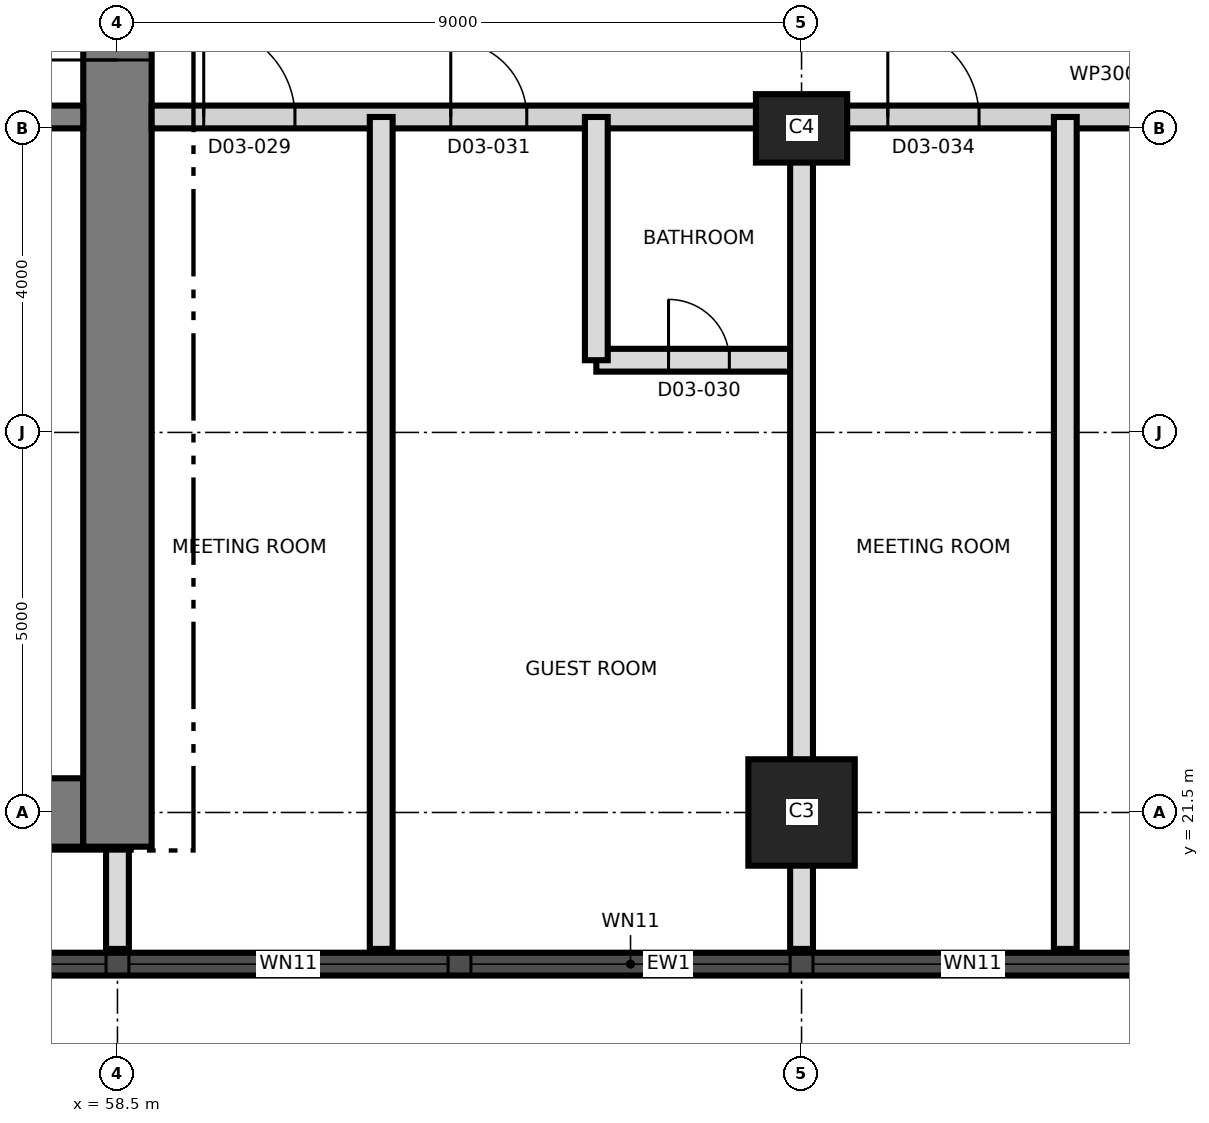
"""IFC4 building model, lengths in metres.
Left out: names, types, materials, properties, quantities, classifications, styles, units other than length and angle.
Written with IfcOpenShell. Run it as: python <this file> out.ifc"""

import sys

from ifc_helpers import new_model, si_unit, direction, frame, frame_2d, origin, origin_2d, place, context, subcontext, project, spatial, rectangle, extrude, element, fill, save


model = new_model("IFC4")
c1 = context("Model", 3, precision=1e-05, world=origin(), true_north=direction((0.0, 1.0)))
c2 = subcontext(c1, "Body", "Model", "MODEL_VIEW")
j1 = project(units=[si_unit("LENGTHUNIT", "METRE"), si_unit("PLANEANGLEUNIT", "RADIAN")], contexts=[c1])
p1 = place(None, origin())
s1 = spatial("IfcSite", under=j1, at=p1, CompositionType="ELEMENT")
p2 = place(p1, origin())
s2 = spatial("IfcBuilding", under=s1, at=p2, CompositionType="ELEMENT")
p3 = place(p2, frame((0.0, 0.0, 55.7)))
s3 = spatial("IfcBuildingStorey", under=s2, at=p3, CompositionType="ELEMENT", Elevation=55.7)
p4 = place(p3, frame((31.05, 21.5, 0.0), z_axis=(0.0, 0.0, 1.0), x_axis=(1.0, 0.0, 0.0)))
e1 = element("IfcWall", 1, at=p4, inside=s3, PredefinedType="SHEAR", context=c2, shape_type="SweptSolid", body=[
    extrude(rectangle(XDim=27.0, YDim=0.9, at=frame_2d((13.5, 0.0))), origin(), (0.0, 0.0, 1.0), 3.7),
])
p5 = place(p3, frame((58.5, 21.05, 0.0), z_axis=(0.0, 0.0, 1.0), x_axis=(0.0, 1.0, 0.0)))
e2 = element("IfcWall", 2, at=p5, inside=s3, PredefinedType="SHEAR", context=c2, shape_type="SweptSolid", body=[
    extrude(rectangle(XDim=18.9, YDim=0.9, at=frame_2d((9.45, 0.0))), origin(), (0.0, 0.0, 1.0), 3.7),
])
p6 = place(p5, frame((10.35, 0.0, 0.0)))
e3 = element("IfcOpeningElement", 3, at=p6, cuts=e2, PredefinedType="OPENING", context=c2, shape_type="SweptSolid", body=[
    extrude(rectangle(XDim=1.2, YDim=2.1, at=frame_2d((0.6, 1.05))), frame((0.0, 0.46, 0.0), z_axis=(0.0, -1.0, 0.0), x_axis=(1.0, 0.0, 0.0)), (0.0, 0.0, 1.0), 0.92),
])
p7 = place(p3, frame((31.95, 30.65, 0.0), z_axis=(0.0, 0.0, 1.0), x_axis=(1.0, 0.0, 0.0)))
e4 = element("IfcWall", 4, at=p7, inside=s3, PredefinedType="SHEAR", context=c2, shape_type="SweptSolid", body=[
    extrude(rectangle(XDim=26.1, YDim=0.3, at=frame_2d((13.05, 0.0))), origin(), (0.0, 0.0, 1.0), 3.7),
])
p8 = place(p7, frame((24.55, 0.0, 0.0)))
e5 = element("IfcOpeningElement", 5, at=p8, cuts=e4, PredefinedType="OPENING", context=c2, shape_type="SweptSolid", body=[
    extrude(rectangle(XDim=1.0, YDim=2.1, at=frame_2d((0.5, 1.05))), frame((0.0, 0.16, 0.0), z_axis=(0.0, -1.0, 0.0), x_axis=(1.0, 0.0, 0.0)), (0.0, 0.0, 1.0), 0.32),
])
p9 = place(p7, frame((11.35, 0.0, 0.0)))
e6 = element("IfcOpeningElement", 6, at=p9, cuts=e4, PredefinedType="OPENING", context=c2, shape_type="SweptSolid", body=[
    extrude(rectangle(XDim=1.0, YDim=2.1, at=frame_2d((0.5, 1.05))), frame((0.0, 0.16, 0.0), z_axis=(0.0, -1.0, 0.0), x_axis=(1.0, 0.0, 0.0)), (0.0, 0.0, 1.0), 0.32),
])
p10 = place(p3, frame((67.5, 21.5, 0.0), z_axis=(0.0, 0.0, 1.0), x_axis=(1.0, 0.0, 0.0)))
e7 = element("IfcColumn", 7, at=p10, inside=s3, PredefinedType="COLUMN", context=c2, shape_type="SweptSolid", body=[
    extrude(rectangle(XDim=1.4, YDim=1.4, at=origin_2d()), origin(), (0.0, 0.0, 1.0), 3.7),
])
p11 = place(p3, frame((67.5, 30.5, 0.0), z_axis=(0.0, 0.0, 1.0), x_axis=(1.0, 0.0, 0.0)))
e8 = element("IfcColumn", 8, at=p11, inside=s3, PredefinedType="COLUMN", context=c2, shape_type="SweptSolid", body=[
    extrude(rectangle(XDim=1.2, YDim=0.9, at=origin_2d()), origin(), (0.0, 0.0, 1.0), 3.7),
])
p12 = place(p3, frame((44.01, 19.505, 0.0), z_axis=(0.0, 0.0, 1.0), x_axis=(1.0, 0.0, 0.0)))
e9 = element("IfcWall", 9, at=p12, inside=s3, PredefinedType="SOLIDWALL", context=c2, shape_type="SweptSolid", body=[
    extrude(rectangle(XDim=43.478, YDim=0.3, at=frame_2d((21.739, 0.0))), origin(), (0.0, 0.0, 1.0), 3.4),
])
p13 = place(p12, frame((1.845, 0.0, 0.3)))
e10 = element("IfcOpeningElement", 10, at=p13, cuts=e9, PredefinedType="OPENING", context=c2, shape_type="SweptSolid", body=[
    extrude(rectangle(XDim=1.8, YDim=2.4, at=frame_2d((0.9, 1.2))), frame((0.0, 0.16, 0.0), z_axis=(0.0, -1.0, 0.0), x_axis=(1.0, 0.0, 0.0)), (0.0, 0.0, 1.0), 0.32),
])
p14 = place(p12, frame((5.64, 0.0, 0.9)))
e11 = element("IfcOpeningElement", 11, at=p14, cuts=e9, PredefinedType="OPENING", context=c2, shape_type="SweptSolid", body=[
    extrude(rectangle(XDim=4.2, YDim=1.5, at=frame_2d((2.1, 0.75))), frame((0.0, 0.16, 0.0), z_axis=(0.0, -1.0, 0.0), x_axis=(1.0, 0.0, 0.0)), (0.0, 0.0, 1.0), 0.32),
])
p15 = place(p12, frame((10.14, 0.0, 0.9)))
e12 = element("IfcOpeningElement", 12, at=p15, cuts=e9, PredefinedType="OPENING", context=c2, shape_type="SweptSolid", body=[
    extrude(rectangle(XDim=4.2, YDim=1.5, at=frame_2d((2.1, 0.75))), frame((0.0, 0.16, 0.0), z_axis=(0.0, -1.0, 0.0), x_axis=(1.0, 0.0, 0.0)), (0.0, 0.0, 1.0), 0.32),
])
p16 = place(p12, frame((14.64, 0.0, 0.9)))
e13 = element("IfcOpeningElement", 13, at=p16, cuts=e9, PredefinedType="OPENING", context=c2, shape_type="SweptSolid", body=[
    extrude(rectangle(XDim=4.2, YDim=1.5, at=frame_2d((2.1, 0.75))), frame((0.0, 0.16, 0.0), z_axis=(0.0, -1.0, 0.0), x_axis=(1.0, 0.0, 0.0)), (0.0, 0.0, 1.0), 0.32),
])
p17 = place(p12, frame((19.14, 0.0, 0.9)))
e14 = element("IfcOpeningElement", 14, at=p17, cuts=e9, PredefinedType="OPENING", context=c2, shape_type="SweptSolid", body=[
    extrude(rectangle(XDim=4.2, YDim=1.5, at=frame_2d((2.1, 0.75))), frame((0.0, 0.16, 0.0), z_axis=(0.0, -1.0, 0.0), x_axis=(1.0, 0.0, 0.0)), (0.0, 0.0, 1.0), 0.32),
])
p18 = place(p12, frame((23.64, 0.0, 0.9)))
e15 = element("IfcOpeningElement", 15, at=p18, cuts=e9, PredefinedType="OPENING", context=c2, shape_type="SweptSolid", body=[
    extrude(rectangle(XDim=4.2, YDim=1.5, at=frame_2d((2.1, 0.75))), frame((0.0, 0.16, 0.0), z_axis=(0.0, -1.0, 0.0), x_axis=(1.0, 0.0, 0.0)), (0.0, 0.0, 1.0), 0.32),
])
p19 = place(p12, frame((28.14, 0.0, 0.9)))
e16 = element("IfcOpeningElement", 16, at=p19, cuts=e9, PredefinedType="OPENING", context=c2, shape_type="SweptSolid", body=[
    extrude(rectangle(XDim=4.2, YDim=1.5, at=frame_2d((2.1, 0.75))), frame((0.0, 0.16, 0.0), z_axis=(0.0, -1.0, 0.0), x_axis=(1.0, 0.0, 0.0)), (0.0, 0.0, 1.0), 0.32),
])
p20 = place(p12, frame((32.64, 0.0, 0.9)))
e17 = element("IfcOpeningElement", 17, at=p20, cuts=e9, PredefinedType="OPENING", context=c2, shape_type="SweptSolid", body=[
    extrude(rectangle(XDim=4.2, YDim=1.5, at=frame_2d((2.1, 0.75))), frame((0.0, 0.16, 0.0), z_axis=(0.0, -1.0, 0.0), x_axis=(1.0, 0.0, 0.0)), (0.0, 0.0, 1.0), 0.32),
])
p21 = place(p12, frame((37.14, 0.0, 0.9)))
e18 = element("IfcOpeningElement", 18, at=p21, cuts=e9, PredefinedType="OPENING", context=c2, shape_type="SweptSolid", body=[
    extrude(rectangle(XDim=4.2, YDim=1.5, at=frame_2d((2.1, 0.75))), frame((0.0, 0.16, 0.0), z_axis=(0.0, -1.0, 0.0), x_axis=(1.0, 0.0, 0.0)), (0.0, 0.0, 1.0), 0.32),
])
p22 = place(p3, frame((64.8, 27.45, 0.0), z_axis=(0.0, 0.0, 1.0), x_axis=(1.0, 0.0, 0.0)))
e19 = element("IfcWall", 19, at=p22, inside=s3, PredefinedType="PARTITIONING", context=c2, shape_type="SweptSolid", body=[
    extrude(rectangle(XDim=2.7, YDim=0.3, at=frame_2d((1.35, 0.0))), origin(), (0.0, 0.0, 1.0), 3.4),
])
p23 = place(p22, frame((0.95, 0.0, 0.0)))
e20 = element("IfcOpeningElement", 20, at=p23, cuts=e19, PredefinedType="OPENING", context=c2, shape_type="SweptSolid", body=[
    extrude(rectangle(XDim=0.8, YDim=2.1, at=frame_2d((0.4, 1.05))), frame((0.0, 0.16, 0.0), z_axis=(0.0, -1.0, 0.0), x_axis=(1.0, 0.0, 0.0)), (0.0, 0.0, 1.0), 0.32),
])
p24 = place(p3, frame((58.95, 30.65, 0.0), z_axis=(0.0, 0.0, 1.0), x_axis=(1.0, 0.0, 0.0)))
e21 = element("IfcWall", 21, at=p24, inside=s3, PredefinedType="PARTITIONING", context=c2, shape_type="SweptSolid", body=[
    extrude(rectangle(XDim=26.38, YDim=0.3, at=frame_2d((13.19, 0.0))), origin(), (0.0, 0.0, 1.0), 3.4),
])
p25 = place(p24, frame((0.685, 0.0, 0.0)))
e22 = element("IfcOpeningElement", 22, at=p25, cuts=e21, PredefinedType="OPENING", context=c2, shape_type="SweptSolid", body=[
    extrude(rectangle(XDim=1.2, YDim=2.1, at=frame_2d((0.6, 1.05))), frame((0.0, 0.16, 0.0), z_axis=(0.0, -1.0, 0.0), x_axis=(1.0, 0.0, 0.0)), (0.0, 0.0, 1.0), 0.32),
])
p26 = place(p24, frame((3.935, 0.0, 0.0)))
e23 = element("IfcOpeningElement", 23, at=p26, cuts=e21, PredefinedType="OPENING", context=c2, shape_type="SweptSolid", body=[
    extrude(rectangle(XDim=1.0, YDim=2.1, at=frame_2d((0.5, 1.05))), frame((0.0, 0.16, 0.0), z_axis=(0.0, -1.0, 0.0), x_axis=(1.0, 0.0, 0.0)), (0.0, 0.0, 1.0), 0.32),
])
p27 = place(p24, frame((9.685, 0.0, 0.0)))
e24 = element("IfcOpeningElement", 24, at=p27, cuts=e21, PredefinedType="OPENING", context=c2, shape_type="SweptSolid", body=[
    extrude(rectangle(XDim=1.2, YDim=2.1, at=frame_2d((0.6, 1.05))), frame((0.0, 0.16, 0.0), z_axis=(0.0, -1.0, 0.0), x_axis=(1.0, 0.0, 0.0)), (0.0, 0.0, 1.0), 0.32),
])
p28 = place(p24, frame((12.935, 0.0, 0.0)))
e25 = element("IfcOpeningElement", 25, at=p28, cuts=e21, PredefinedType="OPENING", context=c2, shape_type="SweptSolid", body=[
    extrude(rectangle(XDim=1.0, YDim=2.1, at=frame_2d((0.5, 1.05))), frame((0.0, 0.16, 0.0), z_axis=(0.0, -1.0, 0.0), x_axis=(1.0, 0.0, 0.0)), (0.0, 0.0, 1.0), 0.32),
])
p29 = place(p24, frame((21.55, 0.0, 0.0)))
e26 = element("IfcOpeningElement", 26, at=p29, cuts=e21, PredefinedType="OPENING", context=c2, shape_type="SweptSolid", body=[
    extrude(rectangle(XDim=1.0, YDim=2.4, at=frame_2d((0.5, 1.2))), frame((0.0, 0.16, 0.0), z_axis=(0.0, -1.0, 0.0), x_axis=(1.0, 0.0, 0.0)), (0.0, 0.0, 1.0), 0.32),
])
p30 = place(p3, frame((58.5, 19.705, 0.0), z_axis=(0.0, 0.0, 1.0), x_axis=(0.0, 1.0, 0.0)))
e27 = element("IfcWall", 27, at=p30, inside=s3, PredefinedType="PARTITIONING", context=c2, shape_type="SweptSolid", body=[
    extrude(rectangle(XDim=1.325, YDim=0.3, at=frame_2d((0.663, 0.0))), origin(), (0.0, 0.0, 1.0), 3.4),
])
p31 = place(p3, frame((61.97, 19.705, 0.0), z_axis=(0.0, 0.0, 1.0), x_axis=(0.0, 1.0, 0.0)))
e28 = element("IfcWall", 28, at=p31, inside=s3, PredefinedType="PARTITIONING", context=c2, shape_type="SweptSolid", body=[
    extrude(rectangle(XDim=10.945, YDim=0.3, at=frame_2d((5.472, 0.0))), origin(), (0.0, 0.0, 1.0), 3.4),
])
p32 = place(p3, frame((64.8, 27.45, 0.0), z_axis=(0.0, 0.0, 1.0), x_axis=(0.0, 1.0, 0.0)))
e29 = element("IfcWall", 29, at=p32, inside=s3, PredefinedType="PARTITIONING", context=c2, shape_type="SweptSolid", body=[
    extrude(rectangle(XDim=3.2, YDim=0.3, at=frame_2d((1.6, 0.0))), origin(), (0.0, 0.0, 1.0), 3.4),
])
for number, where, z_axis, x_axis in (
    (30, (67.5, 19.705, 0.0), (0.0, 0.0, 1.0), (0.0, 1.0, 0.0)),
    (31, (70.97, 19.705, 0.0), (0.0, 0.0, 1.0), (0.0, 1.0, 0.0)),
):
    element("IfcWall", number, at=place(p3, frame(where, z_axis=z_axis, x_axis=x_axis)), inside=s3, PredefinedType="PARTITIONING", context=c2, shape_type="SweptSolid", body=[
        extrude(rectangle(XDim=10.945, YDim=0.3, at=frame_2d((5.472, 0.0))), origin(), (0.0, 0.0, 1.0), 3.4),
    ])
p33 = place(p15, origin())
e32 = element("IfcWindow", 32, at=p33, inside=s3, PartitioningType="SINGLE_PANEL", PredefinedType="WINDOW", context=c2, shape_type="SweptSolid", body=[
    extrude(rectangle(XDim=4.2, YDim=1.5, at=frame_2d((2.1, 0.75))), frame((0.0, 0.03, 0.0), z_axis=(0.0, -1.0, 0.0), x_axis=(1.0, 0.0, 0.0)), (0.0, 0.0, 1.0), 0.06),
])
fill(e12, e32)
p34 = place(p16, origin())
e33 = element("IfcWindow", 33, at=p34, inside=s3, PartitioningType="SINGLE_PANEL", PredefinedType="WINDOW", context=c2, shape_type="SweptSolid", body=[
    extrude(rectangle(XDim=4.2, YDim=1.5, at=frame_2d((2.1, 0.75))), frame((0.0, 0.03, 0.0), z_axis=(0.0, -1.0, 0.0), x_axis=(1.0, 0.0, 0.0)), (0.0, 0.0, 1.0), 0.06),
])
fill(e13, e33)
p35 = place(p17, origin())
e34 = element("IfcWindow", 34, at=p35, inside=s3, PartitioningType="SINGLE_PANEL", PredefinedType="WINDOW", context=c2, shape_type="SweptSolid", body=[
    extrude(rectangle(XDim=4.2, YDim=1.5, at=frame_2d((2.1, 0.75))), frame((0.0, 0.03, 0.0), z_axis=(0.0, -1.0, 0.0), x_axis=(1.0, 0.0, 0.0)), (0.0, 0.0, 1.0), 0.06),
])
fill(e14, e34)
p36 = place(p18, origin())
e35 = element("IfcWindow", 35, at=p36, inside=s3, PartitioningType="SINGLE_PANEL", PredefinedType="WINDOW", context=c2, shape_type="SweptSolid", body=[
    extrude(rectangle(XDim=4.2, YDim=1.5, at=frame_2d((2.1, 0.75))), frame((0.0, 0.03, 0.0), z_axis=(0.0, -1.0, 0.0), x_axis=(1.0, 0.0, 0.0)), (0.0, 0.0, 1.0), 0.06),
])
fill(e15, e35)
p37 = place(p6, origin())
e36 = element("IfcDoor", 36, at=p37, inside=s3, OperationType="SINGLE_SWING_LEFT", PredefinedType="DOOR", context=c2, shape_type="SweptSolid", body=[
    extrude(rectangle(XDim=1.2, YDim=2.1, at=frame_2d((0.6, 1.05))), frame((0.0, 0.025, 0.0), z_axis=(0.0, -1.0, 0.0), x_axis=(1.0, 0.0, 0.0)), (0.0, 0.0, 1.0), 0.05),
])
fill(e3, e36)
p38 = place(p25, origin())
e37 = element("IfcDoor", 37, at=p38, inside=s3, OperationType="SINGLE_SWING_LEFT", PredefinedType="DOOR", context=c2, shape_type="SweptSolid", body=[
    extrude(rectangle(XDim=1.2, YDim=2.1, at=frame_2d((0.6, 1.05))), frame((0.0, 0.025, 0.0), z_axis=(0.0, -1.0, 0.0), x_axis=(1.0, 0.0, 0.0)), (0.0, 0.0, 1.0), 0.05),
])
fill(e22, e37)
p39 = place(p23, origin())
e38 = element("IfcDoor", 38, at=p39, inside=s3, OperationType="SINGLE_SWING_RIGHT", PredefinedType="DOOR", context=c2, shape_type="SweptSolid", body=[
    extrude(rectangle(XDim=0.8, YDim=2.1, at=frame_2d((0.4, 1.05))), frame((0.0, 0.025, 0.0), z_axis=(0.0, -1.0, 0.0), x_axis=(1.0, 0.0, 0.0)), (0.0, 0.0, 1.0), 0.05),
])
fill(e20, e38)
p40 = place(p26, origin())
e39 = element("IfcDoor", 39, at=p40, inside=s3, OperationType="SINGLE_SWING_LEFT", PredefinedType="DOOR", context=c2, shape_type="SweptSolid", body=[
    extrude(rectangle(XDim=1.0, YDim=2.1, at=frame_2d((0.5, 1.05))), frame((0.0, 0.025, 0.0), z_axis=(0.0, -1.0, 0.0), x_axis=(1.0, 0.0, 0.0)), (0.0, 0.0, 1.0), 0.05),
])
fill(e23, e39)
p41 = place(p27, origin())
e40 = element("IfcDoor", 40, at=p41, inside=s3, OperationType="SINGLE_SWING_RIGHT", PredefinedType="DOOR", context=c2, shape_type="SweptSolid", body=[
    extrude(rectangle(XDim=1.2, YDim=2.1, at=frame_2d((0.6, 1.05))), frame((0.0, 0.025, 0.0), z_axis=(0.0, -1.0, 0.0), x_axis=(1.0, 0.0, 0.0)), (0.0, 0.0, 1.0), 0.05),
])
fill(e24, e40)
save(model, sys.argv[1])
